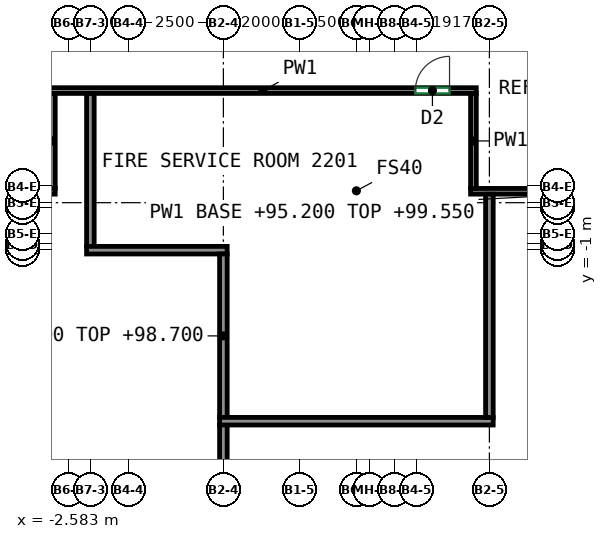
"""IFC4 building model, lengths in metres.
Left out: names, types, materials, properties, quantities, classifications, styles, units other than length and angle.
Written with IfcOpenShell. Run it as: python <this file> out.ifc"""

import sys

from ifc_helpers import new_model, si_unit, direction, frame, frame_2d, origin, place, context, subcontext, project, spatial, rectangle, extrude, element, fill, save


model = new_model("IFC4")
c1 = context("Model", 3, precision=1e-05, world=origin(), true_north=direction((0.0, 1.0)))
c2 = subcontext(c1, "Body", "Model", "MODEL_VIEW")
j1 = project(units=[si_unit("LENGTHUNIT", "METRE"), si_unit("PLANEANGLEUNIT", "RADIAN")], contexts=[c1])
p1 = place(None, origin())
s1 = spatial("IfcSite", under=j1, at=p1, CompositionType="ELEMENT")
p2 = place(p1, origin())
s2 = spatial("IfcBuilding", under=s1, at=p2, CompositionType="ELEMENT")
p3 = place(p2, frame((0.0, 0.0, 95.2)))
s3 = spatial("IfcBuildingStorey", under=s2, at=p3, CompositionType="ELEMENT", Elevation=95.2)
p4 = place(p3, frame((-3.075, 3.2, 0.0), z_axis=(0.0, 0.0, 1.0), x_axis=(1.0, 0.0, 0.0)))
e1 = element("IfcWall", 1, at=p4, inside=s3, PredefinedType="PARTITIONING", context=c2, shape_type="SweptSolid", body=[
    extrude(rectangle(XDim=11.23, YDim=0.15, at=frame_2d((5.615, 0.0))), origin(), (0.0, 0.0, 1.0), 5.0),
])
p5 = place(p4, frame((9.626, 0.0, 0.0)))
e2 = element("IfcOpeningElement", 2, at=p5, cuts=e1, PredefinedType="OPENING", context=c2, shape_type="SweptSolid", body=[
    extrude(rectangle(XDim=0.9, YDim=2.1, at=frame_2d((0.45, 1.05))), frame((0.0, 0.085, 0.0), z_axis=(0.0, -1.0, 0.0), x_axis=(1.0, 0.0, 0.0)), (0.0, 0.0, 1.0), 0.17),
])
p6 = place(p3, frame((-3.0, 0.625, 0.0), z_axis=(0.0, 0.0, 1.0), x_axis=(0.0, 1.0, 0.0)))
e3 = element("IfcWall", 3, at=p6, inside=s3, PredefinedType="PARTITIONING", context=c2, shape_type="SweptSolid", body=[
    extrude(rectangle(XDim=2.5, YDim=0.15, at=frame_2d((1.25, 0.0))), origin(), (0.0, 0.0, 1.0), 5.0),
])
p7 = place(p3, frame((-13.735, 0.55, 0.0), z_axis=(0.0, 0.0, 1.0), x_axis=(1.0, 0.0, 0.0)))
e4 = element("IfcWall", 4, at=p7, inside=s3, PredefinedType="PARTITIONING", context=c2, shape_type="SweptSolid", body=[
    extrude(rectangle(XDim=10.81, YDim=0.15, at=frame_2d((5.405, 0.0))), origin(), (0.0, 0.0, 1.0), 4.35),
])
p8 = place(p3, frame((8.005, 0.55, 0.0), z_axis=(0.0, 0.0, 1.0), x_axis=(1.0, 0.0, 0.0)))
e5 = element("IfcWall", 5, at=p8, inside=s3, PredefinedType="PARTITIONING", context=c2, shape_type="SweptSolid", body=[
    extrude(rectangle(XDim=8.45, YDim=0.15, at=frame_2d((4.225, 0.0))), origin(), (0.0, 0.0, 1.0), 4.35),
])
p9 = place(p3, frame((8.08, 3.125, 0.0), z_axis=(0.0, 0.0, 1.0), x_axis=(0.0, -1.0, 0.0)))
e6 = element("IfcWall", 6, at=p9, inside=s3, PredefinedType="PARTITIONING", context=c2, shape_type="SweptSolid", body=[
    extrude(rectangle(XDim=2.5, YDim=0.15, at=frame_2d((1.25, 0.0))), origin(), (0.0, 0.0, 1.0), 5.0),
])
p10 = place(p3, frame((-2.0, -0.9, 0.0), z_axis=(0.0, 0.0, 1.0), x_axis=(0.0, 1.0, 0.0)))
e7 = element("IfcWall", 7, at=p10, inside=s3, PredefinedType="PARTITIONING", context=c2, shape_type="SweptSolid", body=[
    extrude(rectangle(XDim=4.023, YDim=0.2, at=frame_2d((2.011, 0.0))), origin(), (0.0, 0.0, 1.0), 5.0),
])
p11 = place(p3, frame((-2.1, -1.0, 0.0), z_axis=(0.0, 0.0, 1.0), x_axis=(1.0, 0.0, 0.0)))
e8 = element("IfcWall", 8, at=p11, inside=s3, PredefinedType="PARTITIONING", context=c2, shape_type="SweptSolid", body=[
    extrude(rectangle(XDim=3.7, YDim=0.2, at=frame_2d((1.85, 0.0))), origin(), (0.0, 0.0, 1.0), 5.0),
])
p12 = place(p3, frame((1.5, -5.41, 0.0), z_axis=(0.0, 0.0, 1.0), x_axis=(0.0, 1.0, 0.0)))
e9 = element("IfcWall", 9, at=p12, inside=s3, PredefinedType="PARTITIONING", context=c2, shape_type="SweptSolid", body=[
    extrude(rectangle(XDim=4.31, YDim=0.2, at=frame_2d((2.155, 0.0))), origin(), (0.0, 0.0, 1.0), 3.5),
])
p13 = place(p3, frame((1.5, -9.375, 0.0), z_axis=(0.0, 0.0, 1.0), x_axis=(0.0, 1.0, 0.0)))
e10 = element("IfcWall", 10, at=p13, inside=s3, PredefinedType="PARTITIONING", context=c2, shape_type="SweptSolid", body=[
    extrude(rectangle(XDim=3.785, YDim=0.2, at=frame_2d((1.893, 0.0))), origin(), (0.0, 0.0, 1.0), 3.5),
])
p14 = place(p3, frame((1.4, -5.5, 0.0), z_axis=(0.0, 0.0, 1.0), x_axis=(1.0, 0.0, 0.0)))
e11 = element("IfcWall", 11, at=p14, inside=s3, PredefinedType="PARTITIONING", context=c2, shape_type="SweptSolid", body=[
    extrude(rectangle(XDim=7.2, YDim=0.2, at=frame_2d((3.6, 0.0))), origin(), (0.0, 0.0, 1.0), 5.0),
])
p15 = place(p3, frame((8.5, -5.4, 0.0), z_axis=(0.0, 0.0, 1.0), x_axis=(0.0, 1.0, 0.0)))
e12 = element("IfcWall", 12, at=p15, inside=s3, PredefinedType="PARTITIONING", context=c2, shape_type="SweptSolid", body=[
    extrude(rectangle(XDim=5.873, YDim=0.2, at=frame_2d((2.937, 0.0))), origin(), (0.0, 0.0, 1.0), 5.0),
])
p16 = place(p5, origin())
e13 = element("IfcDoor", 13, at=p16, inside=s3, OperationType="SINGLE_SWING_RIGHT", PredefinedType="DOOR", context=c2, shape_type="SweptSolid", body=[
    extrude(rectangle(XDim=0.9, YDim=2.1, at=frame_2d((0.45, 1.05))), frame((0.0, 0.025, 0.0), z_axis=(0.0, -1.0, 0.0), x_axis=(1.0, 0.0, 0.0)), (0.0, 0.0, 1.0), 0.05),
])
fill(e2, e13)
save(model, sys.argv[1])
